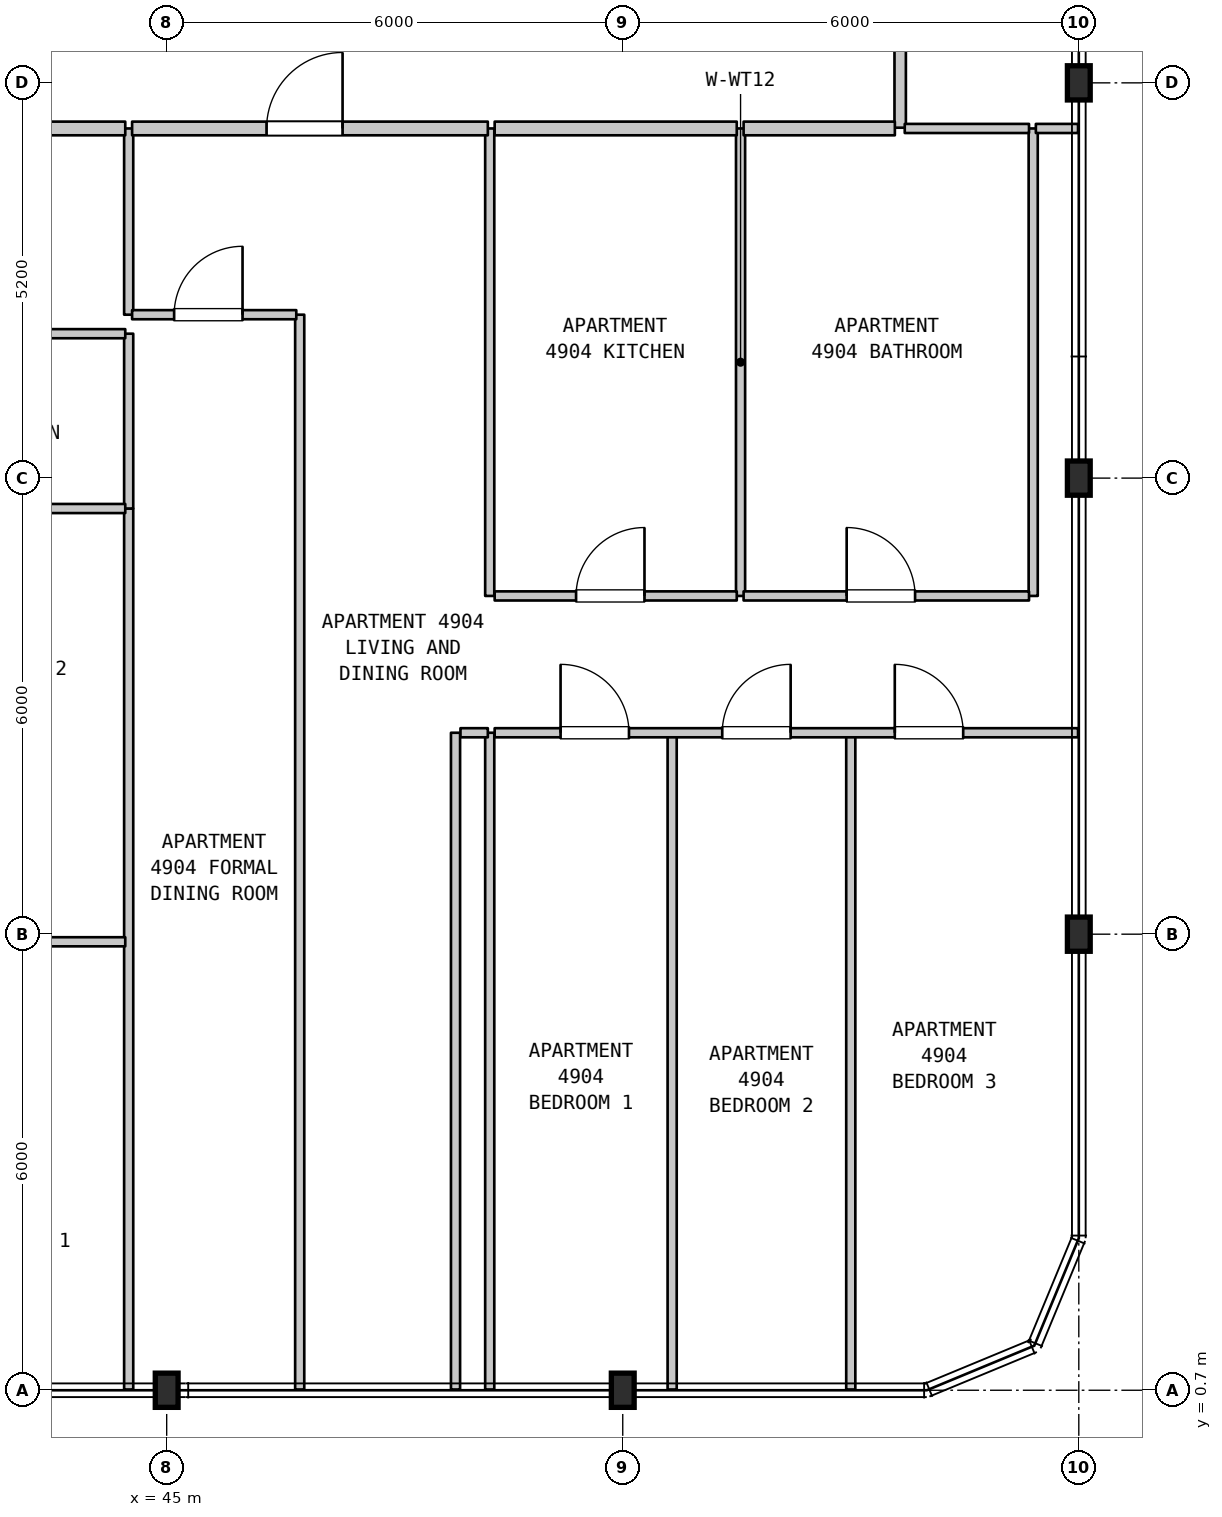
"""IFC4 building model, lengths in metres.
Left out: names, types, materials, properties, quantities, classifications, styles, units other than length and angle.
Written with IfcOpenShell. Run it as: python <this file> out.ifc"""

import sys

from ifc_helpers import new_model, si_unit, direction, frame, frame_2d, origin, origin_2d, place, context, subcontext, project, spatial, rectangle, i_section, extrude, element, fill, save


model = new_model("IFC4")
c1 = context("Model", 3, precision=1e-05, world=origin(), true_north=direction((0.0, 1.0)))
c2 = subcontext(c1, "Body", "Model", "MODEL_VIEW")
j1 = project(units=[si_unit("LENGTHUNIT", "METRE"), si_unit("PLANEANGLEUNIT", "RADIAN")], contexts=[c1])
p1 = place(None, origin())
s1 = spatial("IfcSite", under=j1, at=p1, CompositionType="ELEMENT")
p2 = place(p1, origin())
s2 = spatial("IfcBuilding", under=s1, at=p2, CompositionType="ELEMENT")
p3 = place(p2, frame((0.0, 0.0, 199.5)))
s3 = spatial("IfcBuildingStorey", under=s2, at=p3, CompositionType="ELEMENT", Elevation=199.5)
for number, where, z_axis, x_axis in (
    (1, (45.0, 0.7, 0.0), (0.0, 0.0, 1.0), (1.0, 0.0, 0.0)),
    (2, (51.0, 0.7, 0.0), (0.0, 0.0, 1.0), (1.0, 0.0, 0.0)),
    (3, (57.0, 6.7, 0.0), (0.0, 0.0, 1.0), (1.0, 0.0, 0.0)),
    (4, (57.0, 12.7, 0.0), (0.0, 0.0, 1.0), (1.0, 0.0, 0.0)),
    (5, (57.0, 17.9, 0.0), (0.0, 0.0, 1.0), (1.0, 0.0, 0.0)),
):
    element("IfcColumn", number, at=place(p3, frame(where, z_axis=z_axis, x_axis=x_axis)), inside=s3, PredefinedType="COLUMN", context=c2, shape_type="SweptSolid", body=[
        extrude(i_section(OverallWidth=0.3, OverallDepth=0.45, WebThickness=0.014, FlangeThickness=0.026, FilletRadius=0.027, at=origin_2d()), origin(), (0.0, 0.0, 1.0), 3.7),
    ])
p4 = place(p3, frame((44.5, 0.71, 0.0), z_axis=(0.0, 0.0, 1.0), x_axis=(0.0, 1.0, 0.0)))
e6 = element("IfcWall", 6, at=p4, inside=s3, PredefinedType="PARTITIONING", context=c2, shape_type="SweptSolid", body=[
    extrude(rectangle(XDim=11.59, YDim=0.12, at=frame_2d((5.795, 0.0))), origin(), (0.0, 0.0, 1.0), 3.39),
])
p5 = place(p3, frame((44.5, 12.3, 0.0), z_axis=(0.0, 0.0, 1.0), x_axis=(0.0, 1.0, 0.0)))
e7 = element("IfcWall", 7, at=p5, inside=s3, PredefinedType="PARTITIONING", context=c2, shape_type="SweptSolid", body=[
    extrude(rectangle(XDim=2.3, YDim=0.12, at=frame_2d((1.15, 0.0))), origin(), (0.0, 0.0, 1.0), 3.39),
])
p6 = place(p3, frame((44.5, 14.85, 0.0), z_axis=(0.0, 0.0, 1.0), x_axis=(0.0, 1.0, 0.0)))
e8 = element("IfcWall", 8, at=p6, inside=s3, PredefinedType="PARTITIONING", context=c2, shape_type="SweptSolid", body=[
    extrude(rectangle(XDim=2.45, YDim=0.12, at=frame_2d((1.225, 0.0))), origin(), (0.0, 0.0, 1.0), 3.39),
])
p7 = place(p3, frame((46.75, 0.71, 0.0), z_axis=(0.0, 0.0, 1.0), x_axis=(0.0, 1.0, 0.0)))
e9 = element("IfcWall", 9, at=p7, inside=s3, PredefinedType="PARTITIONING", context=c2, shape_type="SweptSolid", body=[
    extrude(rectangle(XDim=14.14, YDim=0.12, at=frame_2d((7.07, 0.0))), origin(), (0.0, 0.0, 1.0), 3.39),
])
for number, where, z_axis, x_axis in (
    (10, (48.8, 0.71, 0.0), (0.0, 0.0, 1.0), (0.0, 1.0, 0.0)),
    (11, (49.25, 0.71, 0.0), (0.0, 0.0, 1.0), (0.0, 1.0, 0.0)),
):
    element("IfcWall", number, at=place(p3, frame(where, z_axis=z_axis, x_axis=x_axis)), inside=s3, PredefinedType="PARTITIONING", context=c2, shape_type="SweptSolid", body=[
        extrude(rectangle(XDim=8.64, YDim=0.12, at=frame_2d((4.32, 0.0))), origin(), (0.0, 0.0, 1.0), 3.39),
    ])
p8 = place(p3, frame((49.25, 11.15, 0.0), z_axis=(0.0, 0.0, 1.0), x_axis=(0.0, 1.0, 0.0)))
e12 = element("IfcWall", 12, at=p8, inside=s3, PredefinedType="PARTITIONING", context=c2, shape_type="SweptSolid", body=[
    extrude(rectangle(XDim=6.15, YDim=0.12, at=frame_2d((3.075, 0.0))), origin(), (0.0, 0.0, 1.0), 3.39),
])
p9 = place(p3, frame((51.65, 0.71, 0.0), z_axis=(0.0, 0.0, 1.0), x_axis=(0.0, 1.0, 0.0)))
e13 = element("IfcWall", 13, at=p9, inside=s3, PredefinedType="PARTITIONING", context=c2, shape_type="SweptSolid", body=[
    extrude(rectangle(XDim=8.64, YDim=0.12, at=frame_2d((4.32, 0.0))), origin(), (0.0, 0.0, 1.0), 3.39),
])
p10 = place(p3, frame((52.55, 11.15, 0.0), z_axis=(0.0, 0.0, 1.0), x_axis=(0.0, 1.0, 0.0)))
e14 = element("IfcWall", 14, at=p10, inside=s3, PredefinedType="PARTITIONING", context=c2, shape_type="SweptSolid", body=[
    extrude(rectangle(XDim=6.15, YDim=0.12, at=frame_2d((3.075, 0.0))), origin(), (0.0, 0.0, 1.0), 3.39),
])
p11 = place(p3, frame((54.0, 0.71, 0.0), z_axis=(0.0, 0.0, 1.0), x_axis=(0.0, 1.0, 0.0)))
e15 = element("IfcWall", 15, at=p11, inside=s3, PredefinedType="PARTITIONING", context=c2, shape_type="SweptSolid", body=[
    extrude(rectangle(XDim=8.64, YDim=0.12, at=frame_2d((4.32, 0.0))), origin(), (0.0, 0.0, 1.0), 3.39),
])
p12 = place(p3, frame((54.65, 17.31, 0.0), z_axis=(0.0, 0.0, 1.0), x_axis=(0.0, 1.0, 0.0)))
e16 = element("IfcWall", 16, at=p12, inside=s3, PredefinedType="STANDARD", context=c2, shape_type="SweptSolid", body=[
    extrude(rectangle(XDim=2.19, YDim=0.15, at=frame_2d((1.095, 0.0))), origin(), (0.0, 0.0, 1.0), 3.39),
])
p13 = place(p3, frame((56.4, 11.15, 0.0), z_axis=(0.0, 0.0, 1.0), x_axis=(0.0, 1.0, 0.0)))
e17 = element("IfcWall", 17, at=p13, inside=s3, PredefinedType="PARTITIONING", context=c2, shape_type="SweptSolid", body=[
    extrude(rectangle(XDim=6.15, YDim=0.12, at=frame_2d((3.075, 0.0))), origin(), (0.0, 0.0, 1.0), 3.39),
])
p14 = place(p3, frame((40.295, 6.6, 0.0), z_axis=(0.0, 0.0, 1.0), x_axis=(1.0, 0.0, 0.0)))
e18 = element("IfcWall", 18, at=p14, inside=s3, PredefinedType="PARTITIONING", context=c2, shape_type="SweptSolid", body=[
    extrude(rectangle(XDim=4.16, YDim=0.12, at=frame_2d((2.08, 0.0))), origin(), (0.0, 0.0, 1.0), 2.79),
])
p15 = place(p3, frame((48.865, 9.35, 0.0), z_axis=(0.0, 0.0, 1.0), x_axis=(1.0, 0.0, 0.0)))
e19 = element("IfcWall", 19, at=p15, inside=s3, PredefinedType="PARTITIONING", context=c2, shape_type="SweptSolid", body=[
    extrude(rectangle(XDim=0.36, YDim=0.12, at=frame_2d((0.18, 0.0))), origin(), (0.0, 0.0, 1.0), 3.39),
])
p16 = place(p3, frame((49.315, 9.35, 0.0), z_axis=(0.0, 0.0, 1.0), x_axis=(1.0, 0.0, 0.0)))
e20 = element("IfcWall", 20, at=p16, inside=s3, PredefinedType="PARTITIONING", context=c2, shape_type="SweptSolid", body=[
    extrude(rectangle(XDim=7.675, YDim=0.12, at=frame_2d((3.837, 0.0))), origin(), (0.0, 0.0, 1.0), 3.39),
])
p17 = place(p16, frame((0.867, 0.0, 0.0)))
e21 = element("IfcOpeningElement", 21, at=p17, cuts=e20, PredefinedType="OPENING", context=c2, shape_type="SweptSolid", body=[
    extrude(rectangle(XDim=0.9, YDim=2.15, at=frame_2d((0.45, 1.075))), frame((0.0, 0.07, 0.0), z_axis=(0.0, -1.0, 0.0), x_axis=(1.0, 0.0, 0.0)), (0.0, 0.0, 1.0), 0.14),
])
p18 = place(p16, frame((2.994, 0.0, 0.0)))
e22 = element("IfcOpeningElement", 22, at=p18, cuts=e20, PredefinedType="OPENING", context=c2, shape_type="SweptSolid", body=[
    extrude(rectangle(XDim=0.9, YDim=2.15, at=frame_2d((0.45, 1.075))), frame((0.0, 0.07, 0.0), z_axis=(0.0, -1.0, 0.0), x_axis=(1.0, 0.0, 0.0)), (0.0, 0.0, 1.0), 0.14),
])
p19 = place(p16, frame((5.264, 0.0, 0.0)))
e23 = element("IfcOpeningElement", 23, at=p19, cuts=e20, PredefinedType="OPENING", context=c2, shape_type="SweptSolid", body=[
    extrude(rectangle(XDim=0.9, YDim=2.15, at=frame_2d((0.45, 1.075))), frame((0.0, 0.07, 0.0), z_axis=(0.0, -1.0, 0.0), x_axis=(1.0, 0.0, 0.0)), (0.0, 0.0, 1.0), 0.14),
])
p20 = place(p3, frame((49.315, 11.15, 0.0), z_axis=(0.0, 0.0, 1.0), x_axis=(1.0, 0.0, 0.0)))
e24 = element("IfcWall", 24, at=p20, inside=s3, PredefinedType="PARTITIONING", context=c2, shape_type="SweptSolid", body=[
    extrude(rectangle(XDim=3.185, YDim=0.12, at=frame_2d((1.593, 0.0))), origin(), (0.0, 0.0, 1.0), 3.39),
])
p21 = place(p20, frame((1.071, 0.0, 0.0)))
e25 = element("IfcOpeningElement", 25, at=p21, cuts=e24, PredefinedType="OPENING", context=c2, shape_type="SweptSolid", body=[
    extrude(rectangle(XDim=0.9, YDim=2.15, at=frame_2d((0.45, 1.075))), frame((0.0, 0.07, 0.0), z_axis=(0.0, -1.0, 0.0), x_axis=(1.0, 0.0, 0.0)), (0.0, 0.0, 1.0), 0.14),
])
p22 = place(p3, frame((52.59, 11.15, 0.0), z_axis=(0.0, 0.0, 1.0), x_axis=(1.0, 0.0, 0.0)))
e26 = element("IfcWall", 26, at=p22, inside=s3, PredefinedType="PARTITIONING", context=c2, shape_type="SweptSolid", body=[
    extrude(rectangle(XDim=3.755, YDim=0.12, at=frame_2d((1.877, 0.0))), origin(), (0.0, 0.0, 1.0), 3.39),
])
p23 = place(p22, frame((1.356, 0.0, 0.0)))
e27 = element("IfcOpeningElement", 27, at=p23, cuts=e26, PredefinedType="OPENING", context=c2, shape_type="SweptSolid", body=[
    extrude(rectangle(XDim=0.9, YDim=2.1, at=frame_2d((0.45, 1.05))), frame((0.0, 0.07, 0.0), z_axis=(0.0, -1.0, 0.0), x_axis=(1.0, 0.0, 0.0)), (0.0, 0.0, 1.0), 0.14),
])
for number, where, z_axis, x_axis in (
    (28, (40.295, 12.3, 0.0), (0.0, 0.0, 1.0), (1.0, 0.0, 0.0)),
    (29, (40.295, 14.6, 0.0), (0.0, 0.0, 1.0), (1.0, 0.0, 0.0)),
):
    element("IfcWall", number, at=place(p3, frame(where, z_axis=z_axis, x_axis=x_axis)), inside=s3, PredefinedType="PARTITIONING", context=c2, shape_type="SweptSolid", body=[
        extrude(rectangle(XDim=4.16, YDim=0.12, at=frame_2d((2.08, 0.0))), origin(), (0.0, 0.0, 1.0), 3.39),
    ])
p24 = place(p3, frame((44.545, 14.85, 0.0), z_axis=(0.0, 0.0, 1.0), x_axis=(1.0, 0.0, 0.0)))
e30 = element("IfcWall", 30, at=p24, inside=s3, PredefinedType="PARTITIONING", context=c2, shape_type="SweptSolid", body=[
    extrude(rectangle(XDim=2.16, YDim=0.12, at=frame_2d((1.08, 0.0))), origin(), (0.0, 0.0, 1.0), 3.39),
])
p25 = place(p24, frame((0.553, 0.0, 0.0)))
e31 = element("IfcOpeningElement", 31, at=p25, cuts=e30, PredefinedType="OPENING", context=c2, shape_type="SweptSolid", body=[
    extrude(rectangle(XDim=0.9, YDim=2.15, at=frame_2d((0.45, 1.075))), frame((0.0, 0.07, 0.0), z_axis=(0.0, -1.0, 0.0), x_axis=(1.0, 0.0, 0.0)), (0.0, 0.0, 1.0), 0.14),
])
p26 = place(p3, frame((40.295, 17.3, 0.0), z_axis=(0.0, 0.0, 1.0), x_axis=(1.0, 0.0, 0.0)))
e32 = element("IfcWall", 32, at=p26, inside=s3, PredefinedType="STANDARD", context=c2, shape_type="SweptSolid", body=[
    extrude(rectangle(XDim=4.16, YDim=0.18, at=frame_2d((2.08, 0.0))), origin(), (0.0, 0.0, 1.0), 3.39),
])
p27 = place(p3, frame((44.545, 17.3, 0.0), z_axis=(0.0, 0.0, 1.0), x_axis=(1.0, 0.0, 0.0)))
e33 = element("IfcWall", 33, at=p27, inside=s3, PredefinedType="STANDARD", context=c2, shape_type="SweptSolid", body=[
    extrude(rectangle(XDim=4.68, YDim=0.18, at=frame_2d((2.34, 0.0))), origin(), (0.0, 0.0, 1.0), 3.39),
])
p28 = place(p27, frame((1.769, 0.0, 0.0)))
e34 = element("IfcOpeningElement", 34, at=p28, cuts=e33, PredefinedType="OPENING", context=c2, shape_type="SweptSolid", body=[
    extrude(rectangle(XDim=1.0, YDim=2.15, at=frame_2d((0.5, 1.075))), frame((0.0, 0.1, 0.0), z_axis=(0.0, -1.0, 0.0), x_axis=(1.0, 0.0, 0.0)), (0.0, 0.0, 1.0), 0.2),
])
p29 = place(p3, frame((49.315, 17.3, 0.0), z_axis=(0.0, 0.0, 1.0), x_axis=(1.0, 0.0, 0.0)))
e35 = element("IfcWall", 35, at=p29, inside=s3, PredefinedType="STANDARD", context=c2, shape_type="SweptSolid", body=[
    extrude(rectangle(XDim=3.185, YDim=0.18, at=frame_2d((1.593, 0.0))), origin(), (0.0, 0.0, 1.0), 3.39),
])
p30 = place(p3, frame((52.59, 17.3, 0.0), z_axis=(0.0, 0.0, 1.0), x_axis=(1.0, 0.0, 0.0)))
e36 = element("IfcWall", 36, at=p30, inside=s3, PredefinedType="STANDARD", context=c2, shape_type="SweptSolid", body=[
    extrude(rectangle(XDim=1.99, YDim=0.18, at=frame_2d((0.995, 0.0))), origin(), (0.0, 0.0, 1.0), 3.39),
])
p31 = place(p3, frame((54.71, 17.3, 0.0), z_axis=(0.0, 0.0, 1.0), x_axis=(1.0, 0.0, 0.0)))
e37 = element("IfcWall", 37, at=p31, inside=s3, PredefinedType="PARTITIONING", context=c2, shape_type="SweptSolid", body=[
    extrude(rectangle(XDim=1.635, YDim=0.12, at=frame_2d((0.817, 0.0))), origin(), (0.0, 0.0, 1.0), 3.39),
])
p32 = place(p3, frame((56.435, 17.3, 0.0), z_axis=(0.0, 0.0, 1.0), x_axis=(1.0, 0.0, 0.0)))
e38 = element("IfcWall", 38, at=p32, inside=s3, PredefinedType="PARTITIONING", context=c2, shape_type="SweptSolid", body=[
    extrude(rectangle(XDim=0.555, YDim=0.12, at=frame_2d((0.277, 0.0))), origin(), (0.0, 0.0, 1.0), 3.39),
])
p33 = place(p17, origin())
e39 = element("IfcDoor", 39, at=p33, inside=s3, OperationType="SINGLE_SWING_LEFT", PredefinedType="DOOR", context=c2, shape_type="SweptSolid", body=[
    extrude(rectangle(XDim=0.9, YDim=2.15, at=frame_2d((0.45, 1.075))), frame((0.0, 0.025, 0.0), z_axis=(0.0, -1.0, 0.0), x_axis=(1.0, 0.0, 0.0)), (0.0, 0.0, 1.0), 0.05),
])
fill(e21, e39)
p34 = place(p18, origin())
e40 = element("IfcDoor", 40, at=p34, inside=s3, OperationType="SINGLE_SWING_RIGHT", PredefinedType="DOOR", context=c2, shape_type="SweptSolid", body=[
    extrude(rectangle(XDim=0.9, YDim=2.15, at=frame_2d((0.45, 1.075))), frame((0.0, 0.025, 0.0), z_axis=(0.0, -1.0, 0.0), x_axis=(1.0, 0.0, 0.0)), (0.0, 0.0, 1.0), 0.05),
])
fill(e22, e40)
p35 = place(p19, origin())
e41 = element("IfcDoor", 41, at=p35, inside=s3, OperationType="SINGLE_SWING_LEFT", PredefinedType="DOOR", context=c2, shape_type="SweptSolid", body=[
    extrude(rectangle(XDim=0.9, YDim=2.15, at=frame_2d((0.45, 1.075))), frame((0.0, 0.025, 0.0), z_axis=(0.0, -1.0, 0.0), x_axis=(1.0, 0.0, 0.0)), (0.0, 0.0, 1.0), 0.05),
])
fill(e23, e41)
p36 = place(p21, origin())
e42 = element("IfcDoor", 42, at=p36, inside=s3, OperationType="SINGLE_SWING_RIGHT", PredefinedType="DOOR", context=c2, shape_type="SweptSolid", body=[
    extrude(rectangle(XDim=0.9, YDim=2.15, at=frame_2d((0.45, 1.075))), frame((0.0, 0.025, 0.0), z_axis=(0.0, -1.0, 0.0), x_axis=(1.0, 0.0, 0.0)), (0.0, 0.0, 1.0), 0.05),
])
fill(e25, e42)
p37 = place(p23, origin())
e43 = element("IfcDoor", 43, at=p37, inside=s3, OperationType="SINGLE_SWING_LEFT", PredefinedType="DOOR", context=c2, shape_type="SweptSolid", body=[
    extrude(rectangle(XDim=0.9, YDim=2.1, at=frame_2d((0.45, 1.05))), frame((0.0, 0.025, 0.0), z_axis=(0.0, -1.0, 0.0), x_axis=(1.0, 0.0, 0.0)), (0.0, 0.0, 1.0), 0.05),
])
fill(e27, e43)
p38 = place(p25, origin())
e44 = element("IfcDoor", 44, at=p38, inside=s3, OperationType="SINGLE_SWING_RIGHT", PredefinedType="DOOR", context=c2, shape_type="SweptSolid", body=[
    extrude(rectangle(XDim=0.9, YDim=2.15, at=frame_2d((0.45, 1.075))), frame((0.0, 0.025, 0.0), z_axis=(0.0, -1.0, 0.0), x_axis=(1.0, 0.0, 0.0)), (0.0, 0.0, 1.0), 0.05),
])
fill(e31, e44)
p39 = place(p28, origin())
e45 = element("IfcDoor", 45, at=p39, inside=s3, OperationType="SINGLE_SWING_RIGHT", PredefinedType="DOOR", context=c2, shape_type="SweptSolid", body=[
    extrude(rectangle(XDim=1.0, YDim=2.15, at=frame_2d((0.5, 1.075))), frame((0.0, 0.025, 0.0), z_axis=(0.0, -1.0, 0.0), x_axis=(1.0, 0.0, 0.0)), (0.0, 0.0, 1.0), 0.05),
])
fill(e34, e45)
save(model, sys.argv[1])
